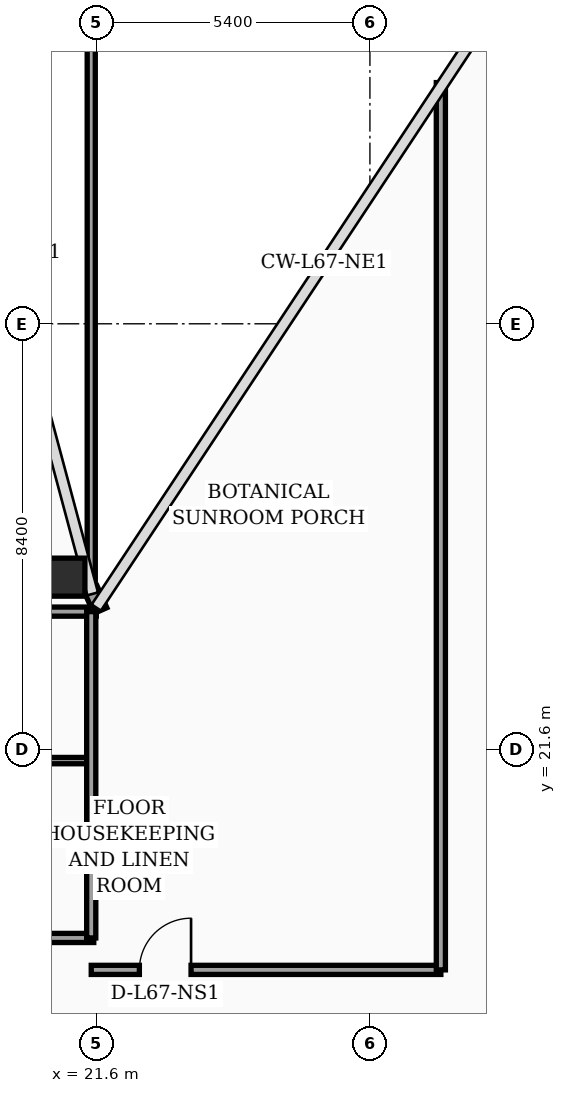
"""IFC4 building model, lengths in metres.
Left out: names, types, materials, properties, quantities, classifications, styles, units other than length and angle.
Written with IfcOpenShell. Run it as: python <this file> out.ifc"""

import sys

from ifc_helpers import new_model, si_unit, direction, frame, frame_2d, origin, origin_2d, place, context, subcontext, project, spatial, rectangle, hollow_rectangle, extrude, element, fill, save


model = new_model("IFC4")
c1 = context("Model", 3, precision=1e-05, world=origin(), true_north=direction((0.0, 1.0)))
c2 = subcontext(c1, "Body", "Model", "MODEL_VIEW")
j1 = project(units=[si_unit("LENGTHUNIT", "METRE"), si_unit("PLANEANGLEUNIT", "RADIAN")], contexts=[c1])
p1 = place(None, origin())
s1 = spatial("IfcSite", under=j1, at=p1, CompositionType="ELEMENT")
p2 = place(p1, origin())
s2 = spatial("IfcBuilding", under=s1, at=p2, CompositionType="ELEMENT")
p3 = place(p2, frame((0.0, 0.0, 271.1)))
s3 = spatial("IfcBuildingStorey", under=s2, at=p3, CompositionType="ELEMENT", Elevation=271.1)
p4 = place(p3, frame((21.0, 25.0, 0.0), z_axis=(0.0, 0.0, 1.0), x_axis=(1.0, 0.0, 0.0)))
e1 = element("IfcColumn", 1, at=p4, inside=s3, PredefinedType="COLUMN", context=c2, shape_type="SweptSolid", body=[
    extrude(hollow_rectangle(XDim=0.75, YDim=0.75, WallThickness=0.032, at=origin_2d()), origin(), (0.0, 0.0, 1.0), 3.56),
])
p5 = place(p3, frame((21.68, 24.34, 0.0), z_axis=(0.0, 0.0, 1.0), x_axis=(-0.40758134973, 0.913168901875, 0.0)))
e2 = element("IfcWall", 2, at=p5, inside=s3, PredefinedType="SOLIDWALL", context=c2, shape_type="SweptSolid", body=[
    extrude(rectangle(XDim=0.471, YDim=0.28, at=frame_2d((0.235, 0.0))), origin(), (0.0, 0.0, 1.0), 3.56),
])
p6 = place(p3, frame((17.65, 17.88, 0.0), z_axis=(0.0, 0.0, 1.0), x_axis=(1.0, 0.0, 0.0)))
e3 = element("IfcWall", 3, at=p6, inside=s3, PredefinedType="PARTITIONING", context=c2, shape_type="SweptSolid", body=[
    extrude(rectangle(XDim=3.9, YDim=0.18, at=frame_2d((1.95, 0.0))), origin(), (0.0, 0.0, 1.0), 3.09),
])
p7 = place(p3, frame((17.65, 21.38, 0.0), z_axis=(0.0, 0.0, 1.0), x_axis=(1.0, 0.0, 0.0)))
e4 = element("IfcWall", 4, at=p7, inside=s3, PredefinedType="PARTITIONING", context=c2, shape_type="SweptSolid", body=[
    extrude(rectangle(XDim=3.9, YDim=0.125, at=frame_2d((1.95, 0.0))), origin(), (0.0, 0.0, 1.0), 3.56),
])
p8 = place(p3, frame((17.65, 24.32, 0.0), z_axis=(0.0, 0.0, 1.0), x_axis=(1.0, 0.0, 0.0)))
e5 = element("IfcWall", 5, at=p8, inside=s3, PredefinedType="PARTITIONING", context=c2, shape_type="SweptSolid", body=[
    extrude(rectangle(XDim=3.95, YDim=0.18, at=frame_2d((1.975, 0.0))), origin(), (0.0, 0.0, 1.0), 3.56),
])
p9 = place(p3, frame((21.5, 17.88, 0.0), z_axis=(0.0, 0.0, 1.0), x_axis=(0.0, 1.0, 0.0)))
e6 = element("IfcWall", 6, at=p9, inside=s3, PredefinedType="PARTITIONING", context=c2, shape_type="SweptSolid", body=[
    extrude(rectangle(XDim=6.44, YDim=0.18, at=frame_2d((3.22, 0.0))), origin(), (0.0, 0.0, 1.0), 3.09),
])
p10 = place(p3, frame((21.5, 24.85, 0.0), z_axis=(0.0, 0.0, 1.0), x_axis=(0.0, 1.0, 0.0)))
e7 = element("IfcWall", 7, at=p10, inside=s3, PredefinedType="PARTITIONING", context=c2, shape_type="SweptSolid", body=[
    extrude(rectangle(XDim=13.05, YDim=0.16, at=frame_2d((6.525, 0.0))), origin(), (0.0, 0.0, 1.0), 2.99),
])
p11 = place(p3, frame((21.5, 17.25, 0.0), z_axis=(0.0, 0.0, 1.0), x_axis=(1.0, 0.0, 0.0)))
e8 = element("IfcWall", 8, at=p11, inside=s3, PredefinedType="PARTITIONING", context=c2, shape_type="SweptSolid", body=[
    extrude(rectangle(XDim=6.9, YDim=0.18, at=frame_2d((3.45, 0.0))), origin(), (0.0, 0.0, 1.0), 3.56),
])
p12 = place(p11, frame((0.95, 0.0, 0.0)))
e9 = element("IfcOpeningElement", 9, at=p12, cuts=e8, PredefinedType="OPENING", context=c2, shape_type="SweptSolid", body=[
    extrude(rectangle(XDim=1.02, YDim=2.2, at=frame_2d((0.51, 1.1))), frame((0.0, 0.1, 0.0), z_axis=(0.0, -1.0, 0.0), x_axis=(1.0, 0.0, 0.0)), (0.0, 0.0, 1.0), 0.2),
])
p13 = place(p3, frame((28.4, 17.25, 0.0), z_axis=(0.0, 0.0, 1.0), x_axis=(0.0, 1.0, 0.0)))
e10 = element("IfcWall", 10, at=p13, inside=s3, PredefinedType="PARTITIONING", context=c2, shape_type="SweptSolid", body=[
    extrude(rectangle(XDim=17.51, YDim=0.18, at=frame_2d((8.755, 0.0))), origin(), (0.0, 0.0, 1.0), 3.09),
])
p14 = place(p12, origin())
e11 = element("IfcDoor", 11, at=p14, inside=s3, OperationType="SINGLE_SWING_RIGHT", PredefinedType="DOOR", context=c2, shape_type="SweptSolid", body=[
    extrude(rectangle(XDim=1.02, YDim=2.2, at=frame_2d((0.51, 1.1))), frame((0.0, 0.025, 0.0), z_axis=(0.0, -1.0, 0.0), x_axis=(1.0, 0.0, 0.0)), (0.0, 0.0, 1.0), 0.05),
])
fill(e9, e11)
save(model, sys.argv[1])
